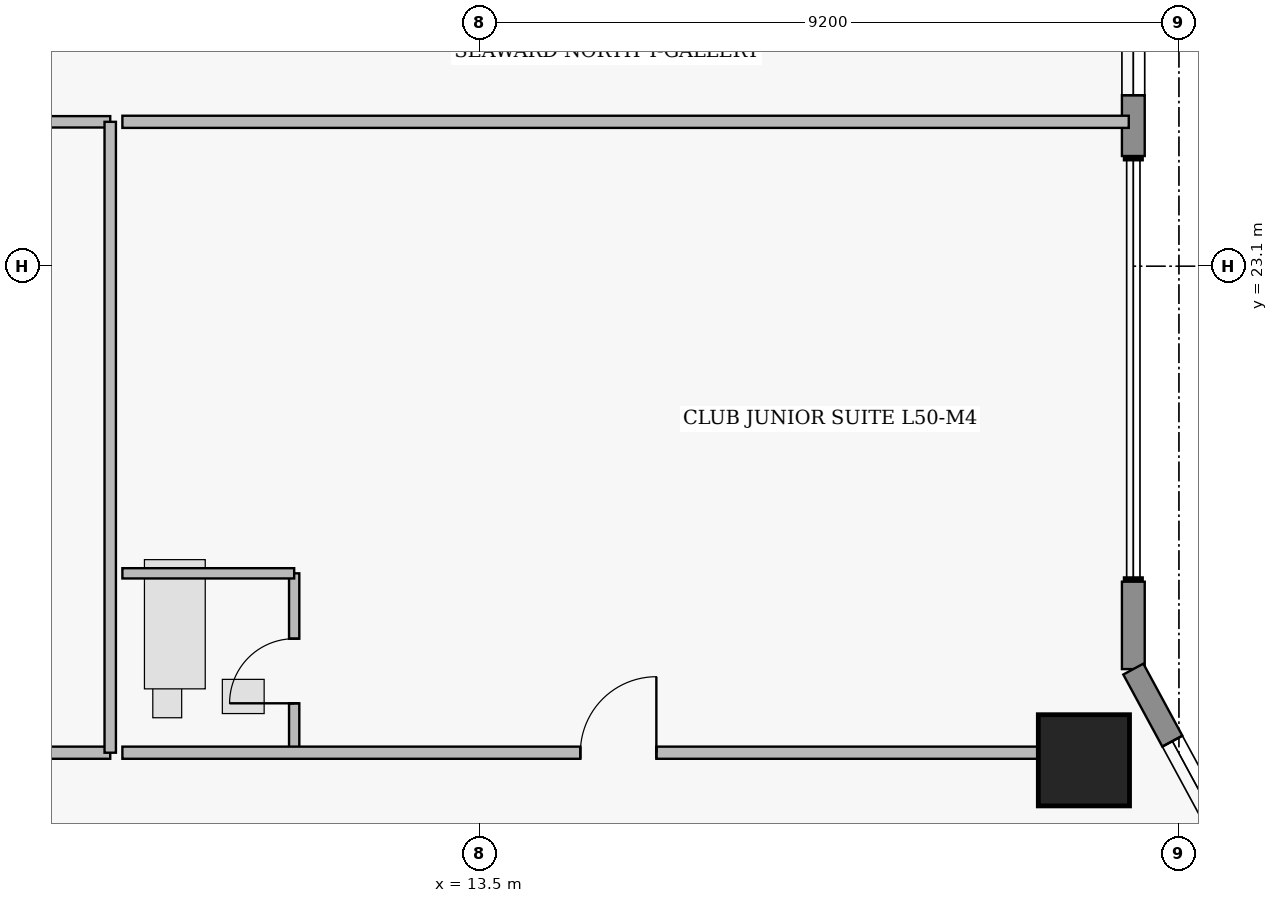
"""IFC4 building model, lengths in metres.
Left out: names, types, materials, properties, quantities, classifications, styles, units other than length and angle.
Written with IfcOpenShell. Run it as: python <this file> out.ifc"""

import sys

from ifc_helpers import new_model, si_unit, direction, frame, frame_2d, origin, origin_2d, place, context, subcontext, project, spatial, rectangle, extrude, element, fill, save


model = new_model("IFC4")
c1 = context("Model", 3, precision=1e-05, world=origin(), true_north=direction((0.0, 1.0)))
c2 = subcontext(c1, "Body", "Model", "MODEL_VIEW")
j1 = project(units=[si_unit("LENGTHUNIT", "METRE"), si_unit("PLANEANGLEUNIT", "RADIAN")], contexts=[c1])
p1 = place(None, origin())
s1 = spatial("IfcSite", under=j1, at=p1, CompositionType="ELEMENT")
p2 = place(p1, origin())
s2 = spatial("IfcBuilding", under=s1, at=p2, CompositionType="ELEMENT")
p3 = place(p2, frame((0.0, 0.0, 199.9)))
s3 = spatial("IfcBuildingStorey", under=s2, at=p3, CompositionType="ELEMENT", Elevation=199.9)
p4 = place(p3, frame((21.45, 16.6, 0.0), z_axis=(0.0, 0.0, 1.0), x_axis=(1.0, 0.0, 0.0)))
e1 = element("IfcColumn", 1, at=p4, inside=s3, PredefinedType="COLUMN", context=c2, shape_type="SweptSolid", body=[
    extrude(rectangle(XDim=1.2, YDim=1.2, at=origin_2d()), origin(), (0.0, 0.0, 1.0), 3.75),
])
p5 = place(p3, frame((22.1, 30.2, 0.0), z_axis=(0.0, 0.0, 1.0), x_axis=(0.0, -1.0, 0.0)))
e2 = element("IfcWall", 2, at=p5, inside=s3, PredefinedType="STANDARD", context=c2, shape_type="SweptSolid", body=[
    extrude(rectangle(XDim=5.65, YDim=0.3, at=frame_2d((2.825, 0.0))), origin(), (0.0, 0.0, 1.0), 3.53),
])
p6 = place(p5, frame((0.935, 0.0, 0.85)))
e3 = element("IfcOpeningElement", 3, at=p6, cuts=e2, PredefinedType="OPENING", context=c2, shape_type="SweptSolid", body=[
    extrude(rectangle(XDim=1.6, YDim=1.8, at=frame_2d((0.8, 0.9))), frame((0.0, 0.16, 0.0), z_axis=(0.0, -1.0, 0.0), x_axis=(1.0, 0.0, 0.0)), (0.0, 0.0, 1.0), 0.32),
])
p7 = place(p5, frame((3.7, 0.0, 0.95)))
e4 = element("IfcOpeningElement", 4, at=p7, cuts=e2, PredefinedType="OPENING", context=c2, shape_type="SweptSolid", body=[
    extrude(rectangle(XDim=1.15, YDim=1.55, at=frame_2d((0.575, 0.775))), frame((0.0, 0.16, 0.0), z_axis=(0.0, -1.0, 0.0), x_axis=(1.0, 0.0, 0.0)), (0.0, 0.0, 1.0), 0.32),
])
p8 = place(p3, frame((22.1, 18.95, 0.0), z_axis=(0.0, 0.0, 1.0), x_axis=(0.0, -1.0, 0.0)))
e5 = element("IfcWall", 5, at=p8, inside=s3, PredefinedType="STANDARD", context=c2, shape_type="SweptSolid", body=[
    extrude(rectangle(XDim=1.15, YDim=0.3, at=frame_2d((0.575, 0.0))), origin(), (0.0, 0.0, 1.0), 3.53),
])
p9 = place(p3, frame((22.1, 17.8, 0.0), z_axis=(0.0, 0.0, 1.0), x_axis=(0.476258655584, -0.879305233114, 0.0)))
e6 = element("IfcWall", 6, at=p9, inside=s3, PredefinedType="STANDARD", context=c2, shape_type="SweptSolid", body=[
    extrude(rectangle(XDim=5.459, YDim=0.3, at=frame_2d((2.729, 0.0))), origin(), (0.0, 0.0, 1.0), 3.53),
])
p10 = place(p9, frame((1.078, 0.0, 1.25)))
e7 = element("IfcOpeningElement", 7, at=p10, cuts=e6, PredefinedType="OPENING", context=c2, shape_type="SweptSolid", body=[
    extrude(rectangle(XDim=1.15, YDim=1.55, at=frame_2d((0.575, 0.775))), frame((0.0, 0.16, 0.0), z_axis=(0.0, -1.0, 0.0), x_axis=(1.0, 0.0, 0.0)), (0.0, 0.0, 1.0), 0.32),
])
p11 = place(p3, frame((0.98, 16.7, 0.0), z_axis=(0.0, 0.0, 1.0), x_axis=(1.0, 0.0, 0.0)))
e8 = element("IfcWall", 8, at=p11, inside=s3, PredefinedType="PARTITIONING", context=c2, shape_type="SweptSolid", body=[
    extrude(rectangle(XDim=7.66, YDim=0.16, at=frame_2d((3.83, 0.0))), origin(), (0.0, 0.0, 1.0), 3.124),
])
p12 = place(p11, frame((5.43, 0.0, 0.0)))
e9 = element("IfcOpeningElement", 9, at=p12, cuts=e8, PredefinedType="OPENING", context=c2, shape_type="SweptSolid", body=[
    extrude(rectangle(XDim=1.08, YDim=2.18, at=frame_2d((0.54, 1.09))), frame((0.0, 0.09, 0.0), z_axis=(0.0, -1.0, 0.0), x_axis=(1.0, 0.0, 0.0)), (0.0, 0.0, 1.0), 0.18),
])
p13 = place(p3, frame((11.06, 16.7, 0.0), z_axis=(0.0, 0.0, 1.0), x_axis=(0.0, 1.0, 0.0)))
e10 = element("IfcWall", 10, at=p13, inside=s3, PredefinedType="PLUMBINGWALL", context=c2, shape_type="SweptSolid", body=[
    extrude(rectangle(XDim=2.36, YDim=0.135, at=frame_2d((1.18, 0.0))), origin(), (0.0, 0.0, 1.0), 3.53),
])
p14 = place(p13, frame((0.65, 0.0, 0.0)))
e11 = element("IfcOpeningElement", 11, at=p14, cuts=e10, PredefinedType="OPENING", context=c2, shape_type="SweptSolid", body=[
    extrude(rectangle(XDim=0.85, YDim=2.1, at=frame_2d((0.425, 1.05))), frame((0.0, 0.077, 0.0), z_axis=(0.0, -1.0, 0.0), x_axis=(1.0, 0.0, 0.0)), (0.0, 0.0, 1.0), 0.155),
])
p15 = place(p3, frame((8.8, 16.7, 0.0), z_axis=(0.0, 0.0, 1.0), x_axis=(1.0, 0.0, 0.0)))
e12 = element("IfcWall", 12, at=p15, inside=s3, PredefinedType="PARTITIONING", context=c2, shape_type="SweptSolid", body=[
    extrude(rectangle(XDim=13.24, YDim=0.16, at=frame_2d((6.62, 0.0))), origin(), (0.0, 0.0, 1.0), 3.124),
])
p16 = place(p15, frame((6.025, 0.0, 0.0)))
e13 = element("IfcOpeningElement", 13, at=p16, cuts=e12, PredefinedType="OPENING", context=c2, shape_type="SweptSolid", body=[
    extrude(rectangle(XDim=1.0, YDim=2.15, at=frame_2d((0.5, 1.075))), frame((0.0, 0.09, 0.0), z_axis=(0.0, -1.0, 0.0), x_axis=(1.0, 0.0, 0.0)), (0.0, 0.0, 1.0), 0.18),
])
p17 = place(p3, frame((0.98, 25.0, 0.0), z_axis=(0.0, 0.0, 1.0), x_axis=(1.0, 0.0, 0.0)))
e14 = element("IfcWall", 14, at=p17, inside=s3, PredefinedType="PARTITIONING", context=c2, shape_type="SweptSolid", body=[
    extrude(rectangle(XDim=7.66, YDim=0.15, at=frame_2d((3.83, 0.0))), origin(), (0.0, 0.0, 1.0), 3.124),
])
p18 = place(p3, frame((8.64, 16.7, 0.0), z_axis=(0.0, 0.0, 1.0), x_axis=(0.0, 1.0, 0.0)))
e15 = element("IfcWall", 15, at=p18, inside=s3, PredefinedType="PARTITIONING", context=c2, shape_type="SweptSolid", body=[
    extrude(rectangle(XDim=8.3, YDim=0.15, at=frame_2d((4.15, 0.0))), origin(), (0.0, 0.0, 1.0), 3.53),
])
p19 = place(p3, frame((8.8, 19.06, 0.0), z_axis=(0.0, 0.0, 1.0), x_axis=(1.0, 0.0, 0.0)))
e16 = element("IfcWall", 16, at=p19, inside=s3, PredefinedType="PLUMBINGWALL", context=c2, shape_type="SweptSolid", body=[
    extrude(rectangle(XDim=2.26, YDim=0.135, at=frame_2d((1.13, 0.0))), origin(), (0.0, 0.0, 1.0), 3.124),
])
p20 = place(p3, frame((8.8, 25.0, 0.0), z_axis=(0.0, 0.0, 1.0), x_axis=(1.0, 0.0, 0.0)))
e17 = element("IfcWall", 17, at=p20, inside=s3, PredefinedType="PARTITIONING", context=c2, shape_type="SweptSolid", body=[
    extrude(rectangle(XDim=13.24, YDim=0.16, at=frame_2d((6.62, 0.0))), origin(), (0.0, 0.0, 1.0), 3.124),
])
p21 = place(p7, origin())
e18 = element("IfcWindow", 18, at=p21, inside=s3, PartitioningType="SINGLE_PANEL", PredefinedType="WINDOW", context=c2, shape_type="SweptSolid", body=[
    extrude(rectangle(XDim=1.15, YDim=1.55, at=frame_2d((0.575, 0.775))), frame((0.0, 0.03, 0.0), z_axis=(0.0, -1.0, 0.0), x_axis=(1.0, 0.0, 0.0)), (0.0, 0.0, 1.0), 0.06),
])
fill(e4, e18)
p22 = place(p10, origin())
e19 = element("IfcWindow", 19, at=p22, inside=s3, PartitioningType="SINGLE_PANEL", PredefinedType="WINDOW", context=c2, shape_type="SweptSolid", body=[
    extrude(rectangle(XDim=1.15, YDim=1.55, at=frame_2d((0.575, 0.775))), frame((0.0, 0.03, 0.0), z_axis=(0.0, -1.0, 0.0), x_axis=(1.0, 0.0, 0.0)), (0.0, 0.0, 1.0), 0.06),
])
fill(e7, e19)
p23 = place(p14, origin())
e20 = element("IfcDoor", 20, at=p23, inside=s3, OperationType="SINGLE_SWING_LEFT", PredefinedType="DOOR", context=c2, shape_type="SweptSolid", body=[
    extrude(rectangle(XDim=0.85, YDim=2.1, at=frame_2d((0.425, 1.05))), frame((0.0, 0.025, 0.0), z_axis=(0.0, -1.0, 0.0), x_axis=(1.0, 0.0, 0.0)), (0.0, 0.0, 1.0), 0.05),
])
fill(e11, e20)
p24 = place(p16, origin())
e21 = element("IfcDoor", 21, at=p24, inside=s3, OperationType="SINGLE_SWING_RIGHT", PredefinedType="DOOR", context=c2, shape_type="SweptSolid", body=[
    extrude(rectangle(XDim=1.0, YDim=2.15, at=frame_2d((0.5, 1.075))), frame((0.0, 0.025, 0.0), z_axis=(0.0, -1.0, 0.0), x_axis=(1.0, 0.0, 0.0)), (0.0, 0.0, 1.0), 0.05),
])
fill(e13, e21)
save(model, sys.argv[1])
